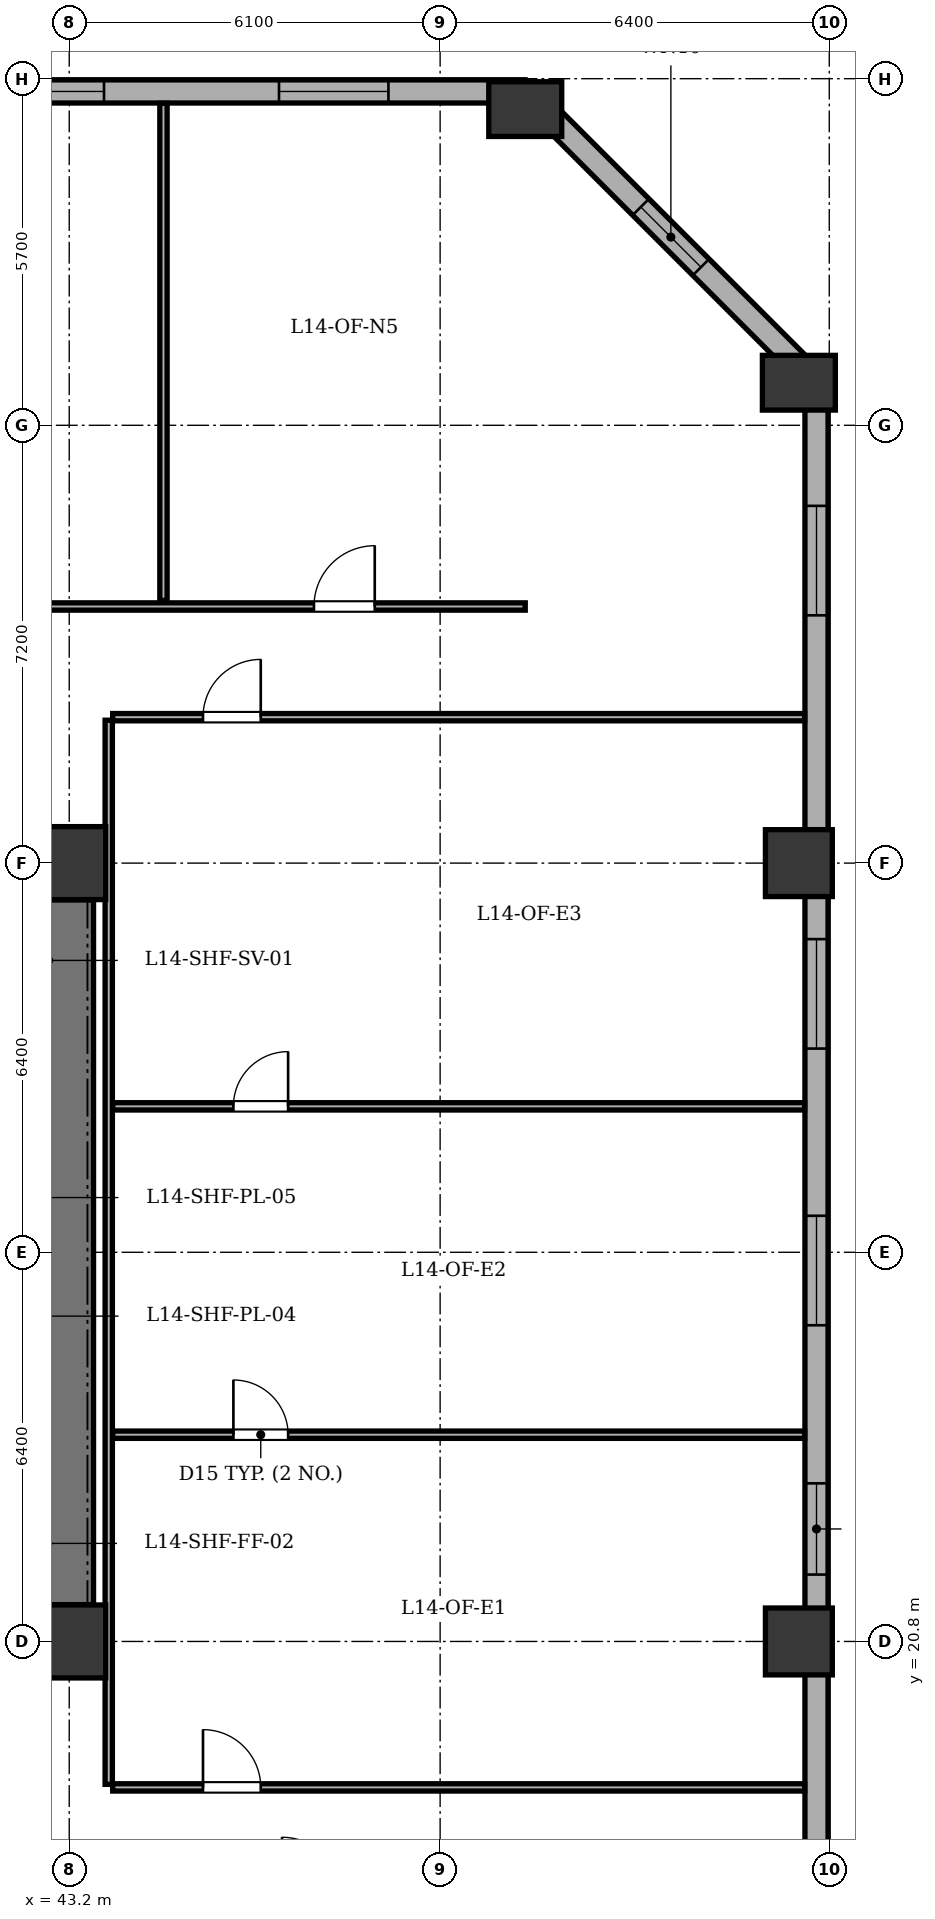
"""IFC4 building model, lengths in metres.
Left out: names, types, materials, properties, quantities, classifications, styles, units other than length and angle.
Written with IfcOpenShell. Run it as: python <this file> out.ifc"""

import sys

from ifc_helpers import new_model, si_unit, direction, frame, frame_2d, origin, origin_2d, place, context, subcontext, project, spatial, rectangle, extrude, element, fill, save


model = new_model("IFC4")
c1 = context("Model", 3, precision=1e-05, world=origin(), true_north=direction((0.0, 1.0)))
c2 = subcontext(c1, "Body", "Model", "MODEL_VIEW")
j1 = project(units=[si_unit("LENGTHUNIT", "METRE"), si_unit("PLANEANGLEUNIT", "RADIAN")], contexts=[c1])
p1 = place(None, origin())
s1 = spatial("IfcSite", under=j1, at=p1, CompositionType="ELEMENT")
p2 = place(p1, origin())
s2 = spatial("IfcBuilding", under=s1, at=p2, CompositionType="ELEMENT")
p3 = place(p2, frame((0.0, 0.0, 59.4)))
s3 = spatial("IfcBuildingStorey", under=s2, at=p3, CompositionType="ELEMENT", Elevation=59.4)
for number, where, z_axis, x_axis in (
    (1, (43.2, 20.8, 0.0), (0.0, 0.0, 1.0), (1.0, 0.0, 0.0)),
    (2, (43.2, 33.6, 0.0), (0.0, 0.0, 1.0), (1.0, 0.0, 0.0)),
):
    element("IfcColumn", number, at=place(p3, frame(where, z_axis=z_axis, x_axis=x_axis)), inside=s3, PredefinedType="COLUMN", context=c2, shape_type="SweptSolid", body=[
        extrude(rectangle(XDim=1.2, YDim=1.2, at=origin_2d()), origin(), (0.0, 0.0, 1.0), 3.9),
    ])
p4 = place(p3, frame((50.7, 46.0, 0.0), z_axis=(0.0, 0.0, 1.0), x_axis=(1.0, 0.0, 0.0)))
e3 = element("IfcColumn", 3, at=p4, inside=s3, PredefinedType="COLUMN", context=c2, shape_type="SweptSolid", body=[
    extrude(rectangle(XDim=0.9, YDim=1.2, at=origin_2d()), origin(), (0.0, 0.0, 1.0), 3.9),
])
for number, where, z_axis, x_axis in (
    (4, (55.2, 20.8, 0.0), (0.0, 0.0, 1.0), (1.0, 0.0, 0.0)),
    (5, (55.2, 33.6, 0.0), (0.0, 0.0, 1.0), (1.0, 0.0, 0.0)),
):
    element("IfcColumn", number, at=place(p3, frame(where, z_axis=z_axis, x_axis=x_axis)), inside=s3, PredefinedType="COLUMN", context=c2, shape_type="SweptSolid", body=[
        extrude(rectangle(XDim=1.1, YDim=1.1, at=origin_2d()), origin(), (0.0, 0.0, 1.0), 3.9),
    ])
p5 = place(p3, frame((55.2, 41.5, 0.0), z_axis=(0.0, 0.0, 1.0), x_axis=(1.0, 0.0, 0.0)))
e6 = element("IfcColumn", 6, at=p5, inside=s3, PredefinedType="COLUMN", context=c2, shape_type="SweptSolid", body=[
    extrude(rectangle(XDim=0.9, YDim=1.2, at=origin_2d()), origin(), (0.0, 0.0, 1.0), 3.9),
])
p6 = place(p3, frame((15.7, 46.29, 0.0), z_axis=(0.0, 0.0, 1.0), x_axis=(1.0, 0.0, 0.0)))
e7 = element("IfcWall", 7, at=p6, inside=s3, PredefinedType="STANDARD", context=c2, shape_type="SweptSolid", body=[
    extrude(rectangle(XDim=35.0, YDim=0.38, at=frame_2d((17.5, 0.0))), origin(), (0.0, 0.0, 1.0), 3.135),
])
p7 = place(p6, frame((8.0, 0.0, 0.0)))
e8 = element("IfcOpeningElement", 8, at=p7, cuts=e7, PredefinedType="OPENING", context=c2, shape_type="SweptSolid", body=[
    extrude(rectangle(XDim=1.0, YDim=2.02, at=frame_2d((0.5, 1.01))), frame((0.0, 0.2, 0.0), z_axis=(0.0, -1.0, 0.0), x_axis=(1.0, 0.0, 0.0)), (0.0, 0.0, 1.0), 0.4),
])
p8 = place(p6, frame((1.675, 0.0, 0.8)))
e9 = element("IfcOpeningElement", 9, at=p8, cuts=e7, PredefinedType="OPENING", context=c2, shape_type="SweptSolid", body=[
    extrude(rectangle(XDim=1.8, YDim=1.9, at=frame_2d((0.9, 0.95))), frame((0.0, 0.2, 0.0), z_axis=(0.0, -1.0, 0.0), x_axis=(1.0, 0.0, 0.0)), (0.0, 0.0, 1.0), 0.4),
])
p9 = place(p6, frame((16.225, 0.0, 0.8)))
e10 = element("IfcOpeningElement", 10, at=p9, cuts=e7, PredefinedType="OPENING", context=c2, shape_type="SweptSolid", body=[
    extrude(rectangle(XDim=1.8, YDim=1.9, at=frame_2d((0.9, 0.95))), frame((0.0, 0.2, 0.0), z_axis=(0.0, -1.0, 0.0), x_axis=(1.0, 0.0, 0.0)), (0.0, 0.0, 1.0), 0.4),
])
p10 = place(p6, frame((23.728, 0.0, 0.8)))
e11 = element("IfcOpeningElement", 11, at=p10, cuts=e7, PredefinedType="OPENING", context=c2, shape_type="SweptSolid", body=[
    extrude(rectangle(XDim=1.8, YDim=1.9, at=frame_2d((0.9, 0.95))), frame((0.0, 0.2, 0.0), z_axis=(0.0, -1.0, 0.0), x_axis=(1.0, 0.0, 0.0)), (0.0, 0.0, 1.0), 0.4),
])
p11 = place(p6, frame((26.272, 0.0, 0.8)))
e12 = element("IfcOpeningElement", 12, at=p11, cuts=e7, PredefinedType="OPENING", context=c2, shape_type="SweptSolid", body=[
    extrude(rectangle(XDim=1.8, YDim=1.9, at=frame_2d((0.9, 0.95))), frame((0.0, 0.2, 0.0), z_axis=(0.0, -1.0, 0.0), x_axis=(1.0, 0.0, 0.0)), (0.0, 0.0, 1.0), 0.4),
])
p12 = place(p6, frame((30.95, 0.0, 0.8)))
e13 = element("IfcOpeningElement", 13, at=p12, cuts=e7, PredefinedType="OPENING", context=c2, shape_type="SweptSolid", body=[
    extrude(rectangle(XDim=1.8, YDim=1.9, at=frame_2d((0.9, 0.95))), frame((0.0, 0.2, 0.0), z_axis=(0.0, -1.0, 0.0), x_axis=(1.0, 0.0, 0.0)), (0.0, 0.0, 1.0), 0.4),
])
p13 = place(p3, frame((50.7, 46.29, 0.0), z_axis=(0.0, 0.0, 1.0), x_axis=(0.707106781187, -0.707106781187, 0.0)))
e14 = element("IfcWall", 14, at=p13, inside=s3, PredefinedType="STANDARD", context=c2, shape_type="SweptSolid", body=[
    extrude(rectangle(XDim=6.774, YDim=0.38, at=frame_2d((3.387, 0.0))), origin(), (0.0, 0.0, 1.0), 3.135),
])
p14 = place(p13, frame((2.687, 0.0, 0.8)))
e15 = element("IfcOpeningElement", 15, at=p14, cuts=e14, PredefinedType="OPENING", context=c2, shape_type="SweptSolid", body=[
    extrude(rectangle(XDim=1.4, YDim=1.65, at=frame_2d((0.7, 0.825))), frame((0.0, 0.2, 0.0), z_axis=(0.0, -1.0, 0.0), x_axis=(1.0, 0.0, 0.0)), (0.0, 0.0, 1.0), 0.4),
])
p15 = place(p3, frame((55.49, 41.5, 0.0), z_axis=(0.0, 0.0, 1.0), x_axis=(0.0, -1.0, 0.0)))
e16 = element("IfcWall", 16, at=p15, inside=s3, PredefinedType="STANDARD", context=c2, shape_type="SweptSolid", body=[
    extrude(rectangle(XDim=35.0, YDim=0.38, at=frame_2d((17.5, 0.0))), origin(), (0.0, 0.0, 1.0), 3.135),
])
p16 = place(p15, frame((2.025, 0.0, 0.8)))
e17 = element("IfcOpeningElement", 17, at=p16, cuts=e16, PredefinedType="OPENING", context=c2, shape_type="SweptSolid", body=[
    extrude(rectangle(XDim=1.8, YDim=1.9, at=frame_2d((0.9, 0.95))), frame((0.0, 0.2, 0.0), z_axis=(0.0, -1.0, 0.0), x_axis=(1.0, 0.0, 0.0)), (0.0, 0.0, 1.0), 0.4),
])
p17 = place(p15, frame((9.15, 0.0, 0.8)))
e18 = element("IfcOpeningElement", 18, at=p17, cuts=e16, PredefinedType="OPENING", context=c2, shape_type="SweptSolid", body=[
    extrude(rectangle(XDim=1.8, YDim=1.9, at=frame_2d((0.9, 0.95))), frame((0.0, 0.2, 0.0), z_axis=(0.0, -1.0, 0.0), x_axis=(1.0, 0.0, 0.0)), (0.0, 0.0, 1.0), 0.4),
])
p18 = place(p15, frame((13.7, 0.0, 0.8)))
e19 = element("IfcOpeningElement", 19, at=p18, cuts=e16, PredefinedType="OPENING", context=c2, shape_type="SweptSolid", body=[
    extrude(rectangle(XDim=1.8, YDim=1.9, at=frame_2d((0.9, 0.95))), frame((0.0, 0.2, 0.0), z_axis=(0.0, -1.0, 0.0), x_axis=(1.0, 0.0, 0.0)), (0.0, 0.0, 1.0), 0.4),
])
p19 = place(p15, frame((18.1, 0.0, 0.8)))
e20 = element("IfcOpeningElement", 20, at=p19, cuts=e16, PredefinedType="OPENING", context=c2, shape_type="SweptSolid", body=[
    extrude(rectangle(XDim=1.5, YDim=1.9, at=frame_2d((0.75, 0.95))), frame((0.0, 0.2, 0.0), z_axis=(0.0, -1.0, 0.0), x_axis=(1.0, 0.0, 0.0)), (0.0, 0.0, 1.0), 0.4),
])
p20 = place(p15, frame((25.443, 0.0, 0.8)))
e21 = element("IfcOpeningElement", 21, at=p20, cuts=e16, PredefinedType="OPENING", context=c2, shape_type="SweptSolid", body=[
    extrude(rectangle(XDim=1.8, YDim=1.9, at=frame_2d((0.9, 0.95))), frame((0.0, 0.2, 0.0), z_axis=(0.0, -1.0, 0.0), x_axis=(1.0, 0.0, 0.0)), (0.0, 0.0, 1.0), 0.4),
])
p21 = place(p15, frame((30.207, 0.0, 0.8)))
e22 = element("IfcOpeningElement", 22, at=p21, cuts=e16, PredefinedType="OPENING", context=c2, shape_type="SweptSolid", body=[
    extrude(rectangle(XDim=2.4, YDim=1.9, at=frame_2d((1.2, 0.95))), frame((0.0, 0.2, 0.0), z_axis=(0.0, -1.0, 0.0), x_axis=(1.0, 0.0, 0.0)), (0.0, 0.0, 1.0), 0.4),
])
p22 = place(p3, frame((43.2, 21.405, 0.0), z_axis=(0.0, 0.0, 1.0), x_axis=(0.0, 1.0, 0.0)))
e23 = element("IfcWall", 23, at=p22, inside=s3, PredefinedType="SHEAR", context=c2, shape_type="SweptSolid", body=[
    extrude(rectangle(XDim=11.59, YDim=0.8, at=frame_2d((5.795, 0.0))), origin(), (0.0, 0.0, 1.0), 3.6),
])
p23 = place(p3, frame((15.7, 37.82, 0.0), z_axis=(0.0, 0.0, 1.0), x_axis=(1.0, 0.0, 0.0)))
e24 = element("IfcWall", 24, at=p23, inside=s3, PredefinedType="PARTITIONING", context=c2, shape_type="SweptSolid", body=[
    extrude(rectangle(XDim=35.0, YDim=0.12, at=frame_2d((17.5, 0.0))), origin(), (0.0, 0.0, 1.0), 3.6),
])
p24 = place(p23, frame((3.175, 0.0, 0.0)))
e25 = element("IfcOpeningElement", 25, at=p24, cuts=e24, PredefinedType="OPENING", context=c2, shape_type="SweptSolid", body=[
    extrude(rectangle(XDim=1.0, YDim=2.1, at=frame_2d((0.5, 1.05))), frame((0.0, 0.07, 0.0), z_axis=(0.0, -1.0, 0.0), x_axis=(1.0, 0.0, 0.0)), (0.0, 0.0, 1.0), 0.14),
])
p25 = place(p23, frame((10.7, 0.0, 0.0)))
e26 = element("IfcOpeningElement", 26, at=p25, cuts=e24, PredefinedType="OPENING", context=c2, shape_type="SweptSolid", body=[
    extrude(rectangle(XDim=1.0, YDim=2.1, at=frame_2d((0.5, 1.05))), frame((0.0, 0.07, 0.0), z_axis=(0.0, -1.0, 0.0), x_axis=(1.0, 0.0, 0.0)), (0.0, 0.0, 1.0), 0.14),
])
p26 = place(p23, frame((18.4, 0.0, 0.0)))
e27 = element("IfcOpeningElement", 27, at=p26, cuts=e24, PredefinedType="OPENING", context=c2, shape_type="SweptSolid", body=[
    extrude(rectangle(XDim=1.0, YDim=2.1, at=frame_2d((0.5, 1.05))), frame((0.0, 0.07, 0.0), z_axis=(0.0, -1.0, 0.0), x_axis=(1.0, 0.0, 0.0)), (0.0, 0.0, 1.0), 0.14),
])
p27 = place(p23, frame((25.4, 0.0, 0.0)))
e28 = element("IfcOpeningElement", 28, at=p27, cuts=e24, PredefinedType="OPENING", context=c2, shape_type="SweptSolid", body=[
    extrude(rectangle(XDim=1.0, YDim=2.1, at=frame_2d((0.5, 1.05))), frame((0.0, 0.07, 0.0), z_axis=(0.0, -1.0, 0.0), x_axis=(1.0, 0.0, 0.0)), (0.0, 0.0, 1.0), 0.14),
])
p28 = place(p23, frame((31.525, 0.0, 0.0)))
e29 = element("IfcOpeningElement", 29, at=p28, cuts=e24, PredefinedType="OPENING", context=c2, shape_type="SweptSolid", body=[
    extrude(rectangle(XDim=1.0, YDim=2.1, at=frame_2d((0.5, 1.05))), frame((0.0, 0.07, 0.0), z_axis=(0.0, -1.0, 0.0), x_axis=(1.0, 0.0, 0.0)), (0.0, 0.0, 1.0), 0.14),
])
p29 = place(p3, frame((44.75, 37.92, 0.0), z_axis=(0.0, 0.0, 1.0), x_axis=(0.0, 1.0, 0.0)))
e30 = element("IfcWall", 30, at=p29, inside=s3, PredefinedType="PARTITIONING", context=c2, shape_type="SweptSolid", body=[
    extrude(rectangle(XDim=8.175, YDim=0.12, at=frame_2d((4.087, 0.0))), origin(), (0.0, 0.0, 1.0), 3.6),
])
p30 = place(p3, frame((43.85, 18.45, 0.0), z_axis=(0.0, 0.0, 1.0), x_axis=(0.0, 1.0, 0.0)))
e31 = element("IfcWall", 31, at=p30, inside=s3, PredefinedType="PARTITIONING", context=c2, shape_type="SweptSolid", body=[
    extrude(rectangle(XDim=17.5, YDim=0.12, at=frame_2d((8.75, 0.0))), origin(), (0.0, 0.0, 1.0), 3.6),
])
p31 = place(p3, frame((43.915, 18.4, 0.0), z_axis=(0.0, 0.0, 1.0), x_axis=(1.0, 0.0, 0.0)))
e32 = element("IfcWall", 32, at=p31, inside=s3, PredefinedType="PARTITIONING", context=c2, shape_type="SweptSolid", body=[
    extrude(rectangle(XDim=11.38, YDim=0.12, at=frame_2d((5.69, 0.0))), origin(), (0.0, 0.0, 1.0), 3.6),
])
p32 = place(p31, frame((1.485, 0.0, 0.0)))
e33 = element("IfcOpeningElement", 33, at=p32, cuts=e32, PredefinedType="OPENING", context=c2, shape_type="SweptSolid", body=[
    extrude(rectangle(XDim=0.95, YDim=2.1, at=frame_2d((0.475, 1.05))), frame((0.0, 0.07, 0.0), z_axis=(0.0, -1.0, 0.0), x_axis=(1.0, 0.0, 0.0)), (0.0, 0.0, 1.0), 0.14),
])
p33 = place(p3, frame((43.915, 36.0, 0.0), z_axis=(0.0, 0.0, 1.0), x_axis=(1.0, 0.0, 0.0)))
e34 = element("IfcWall", 34, at=p33, inside=s3, PredefinedType="PARTITIONING", context=c2, shape_type="SweptSolid", body=[
    extrude(rectangle(XDim=11.38, YDim=0.12, at=frame_2d((5.69, 0.0))), origin(), (0.0, 0.0, 1.0), 3.6),
])
p34 = place(p33, frame((1.485, 0.0, 0.0)))
e35 = element("IfcOpeningElement", 35, at=p34, cuts=e34, PredefinedType="OPENING", context=c2, shape_type="SweptSolid", body=[
    extrude(rectangle(XDim=0.95, YDim=2.1, at=frame_2d((0.475, 1.05))), frame((0.0, 0.07, 0.0), z_axis=(0.0, -1.0, 0.0), x_axis=(1.0, 0.0, 0.0)), (0.0, 0.0, 1.0), 0.14),
])
p35 = place(p3, frame((43.915, 24.2, 0.0), z_axis=(0.0, 0.0, 1.0), x_axis=(1.0, 0.0, 0.0)))
e36 = element("IfcWall", 36, at=p35, inside=s3, PredefinedType="PARTITIONING", context=c2, shape_type="SweptSolid", body=[
    extrude(rectangle(XDim=11.38, YDim=0.12, at=frame_2d((5.69, 0.0))), origin(), (0.0, 0.0, 1.0), 3.6),
])
p36 = place(p35, frame((1.985, 0.0, 0.0)))
e37 = element("IfcOpeningElement", 37, at=p36, cuts=e36, PredefinedType="OPENING", context=c2, shape_type="SweptSolid", body=[
    extrude(rectangle(XDim=0.9, YDim=2.05, at=frame_2d((0.45, 1.025))), frame((0.0, 0.07, 0.0), z_axis=(0.0, -1.0, 0.0), x_axis=(1.0, 0.0, 0.0)), (0.0, 0.0, 1.0), 0.14),
])
p37 = place(p3, frame((43.915, 29.6, 0.0), z_axis=(0.0, 0.0, 1.0), x_axis=(1.0, 0.0, 0.0)))
e38 = element("IfcWall", 38, at=p37, inside=s3, PredefinedType="PARTITIONING", context=c2, shape_type="SweptSolid", body=[
    extrude(rectangle(XDim=11.38, YDim=0.12, at=frame_2d((5.69, 0.0))), origin(), (0.0, 0.0, 1.0), 3.6),
])
p38 = place(p37, frame((1.985, 0.0, 0.0)))
e39 = element("IfcOpeningElement", 39, at=p38, cuts=e38, PredefinedType="OPENING", context=c2, shape_type="SweptSolid", body=[
    extrude(rectangle(XDim=0.9, YDim=2.05, at=frame_2d((0.45, 1.025))), frame((0.0, 0.07, 0.0), z_axis=(0.0, -1.0, 0.0), x_axis=(1.0, 0.0, 0.0)), (0.0, 0.0, 1.0), 0.14),
])
p39 = place(p11, origin())
e40 = element("IfcWindow", 40, at=p39, inside=s3, PartitioningType="SINGLE_PANEL", PredefinedType="WINDOW", context=c2, shape_type="SweptSolid", body=[
    extrude(rectangle(XDim=1.8, YDim=1.9, at=frame_2d((0.9, 0.95))), frame((0.0, -0.01, 0.0), z_axis=(0.0, -1.0, 0.0), x_axis=(1.0, 0.0, 0.0)), (0.0, 0.0, 1.0), 0.06),
])
fill(e12, e40)
p40 = place(p12, origin())
e41 = element("IfcWindow", 41, at=p40, inside=s3, PartitioningType="SINGLE_PANEL", PredefinedType="WINDOW", context=c2, shape_type="SweptSolid", body=[
    extrude(rectangle(XDim=1.8, YDim=1.9, at=frame_2d((0.9, 0.95))), frame((0.0, -0.01, 0.0), z_axis=(0.0, -1.0, 0.0), x_axis=(1.0, 0.0, 0.0)), (0.0, 0.0, 1.0), 0.06),
])
fill(e13, e41)
p41 = place(p16, origin())
e42 = element("IfcWindow", 42, at=p41, inside=s3, PartitioningType="SINGLE_PANEL", PredefinedType="WINDOW", context=c2, shape_type="SweptSolid", body=[
    extrude(rectangle(XDim=1.8, YDim=1.9, at=frame_2d((0.9, 0.95))), frame((0.0, -0.01, 0.0), z_axis=(0.0, -1.0, 0.0), x_axis=(1.0, 0.0, 0.0)), (0.0, 0.0, 1.0), 0.06),
])
fill(e17, e42)
p42 = place(p17, origin())
e43 = element("IfcWindow", 43, at=p42, inside=s3, PartitioningType="SINGLE_PANEL", PredefinedType="WINDOW", context=c2, shape_type="SweptSolid", body=[
    extrude(rectangle(XDim=1.8, YDim=1.9, at=frame_2d((0.9, 0.95))), frame((0.0, -0.01, 0.0), z_axis=(0.0, -1.0, 0.0), x_axis=(1.0, 0.0, 0.0)), (0.0, 0.0, 1.0), 0.06),
])
fill(e18, e43)
p43 = place(p18, origin())
e44 = element("IfcWindow", 44, at=p43, inside=s3, PartitioningType="SINGLE_PANEL", PredefinedType="WINDOW", context=c2, shape_type="SweptSolid", body=[
    extrude(rectangle(XDim=1.8, YDim=1.9, at=frame_2d((0.9, 0.95))), frame((0.0, -0.01, 0.0), z_axis=(0.0, -1.0, 0.0), x_axis=(1.0, 0.0, 0.0)), (0.0, 0.0, 1.0), 0.06),
])
fill(e19, e44)
p44 = place(p19, origin())
e45 = element("IfcWindow", 45, at=p44, inside=s3, PartitioningType="SINGLE_PANEL", PredefinedType="WINDOW", context=c2, shape_type="SweptSolid", body=[
    extrude(rectangle(XDim=1.5, YDim=1.9, at=frame_2d((0.75, 0.95))), frame((0.0, -0.01, 0.0), z_axis=(0.0, -1.0, 0.0), x_axis=(1.0, 0.0, 0.0)), (0.0, 0.0, 1.0), 0.06),
])
fill(e20, e45)
p45 = place(p14, origin())
e46 = element("IfcWindow", 46, at=p45, inside=s3, PartitioningType="SINGLE_PANEL", PredefinedType="WINDOW", context=c2, shape_type="SweptSolid", body=[
    extrude(rectangle(XDim=1.4, YDim=1.65, at=frame_2d((0.7, 0.825))), frame((0.0, -0.01, 0.0), z_axis=(0.0, -1.0, 0.0), x_axis=(1.0, 0.0, 0.0)), (0.0, 0.0, 1.0), 0.06),
])
fill(e15, e46)
p46 = place(p28, origin())
e47 = element("IfcDoor", 47, at=p46, inside=s3, OperationType="SINGLE_SWING_RIGHT", PredefinedType="DOOR", context=c2, shape_type="SweptSolid", body=[
    extrude(rectangle(XDim=1.0, YDim=2.1, at=frame_2d((0.5, 1.05))), frame((0.0, 0.025, 0.0), z_axis=(0.0, -1.0, 0.0), x_axis=(1.0, 0.0, 0.0)), (0.0, 0.0, 1.0), 0.05),
])
fill(e29, e47)
p47 = place(p36, origin())
e48 = element("IfcDoor", 48, at=p47, inside=s3, OperationType="SINGLE_SWING_LEFT", PredefinedType="DOOR", context=c2, shape_type="SweptSolid", body=[
    extrude(rectangle(XDim=0.9, YDim=2.05, at=frame_2d((0.45, 1.025))), frame((0.0, 0.025, 0.0), z_axis=(0.0, -1.0, 0.0), x_axis=(1.0, 0.0, 0.0)), (0.0, 0.0, 1.0), 0.05),
])
fill(e37, e48)
p48 = place(p38, origin())
e49 = element("IfcDoor", 49, at=p48, inside=s3, OperationType="SINGLE_SWING_RIGHT", PredefinedType="DOOR", context=c2, shape_type="SweptSolid", body=[
    extrude(rectangle(XDim=0.9, YDim=2.05, at=frame_2d((0.45, 1.025))), frame((0.0, 0.025, 0.0), z_axis=(0.0, -1.0, 0.0), x_axis=(1.0, 0.0, 0.0)), (0.0, 0.0, 1.0), 0.05),
])
fill(e39, e49)
p49 = place(p32, origin())
e50 = element("IfcDoor", 50, at=p49, inside=s3, OperationType="SINGLE_SWING_LEFT", PredefinedType="DOOR", context=c2, shape_type="SweptSolid", body=[
    extrude(rectangle(XDim=0.95, YDim=2.1, at=frame_2d((0.475, 1.05))), frame((0.0, 0.025, 0.0), z_axis=(0.0, -1.0, 0.0), x_axis=(1.0, 0.0, 0.0)), (0.0, 0.0, 1.0), 0.05),
])
fill(e33, e50)
p50 = place(p34, origin())
e51 = element("IfcDoor", 51, at=p50, inside=s3, OperationType="SINGLE_SWING_RIGHT", PredefinedType="DOOR", context=c2, shape_type="SweptSolid", body=[
    extrude(rectangle(XDim=0.95, YDim=2.1, at=frame_2d((0.475, 1.05))), frame((0.0, 0.025, 0.0), z_axis=(0.0, -1.0, 0.0), x_axis=(1.0, 0.0, 0.0)), (0.0, 0.0, 1.0), 0.05),
])
fill(e35, e51)
save(model, sys.argv[1])
